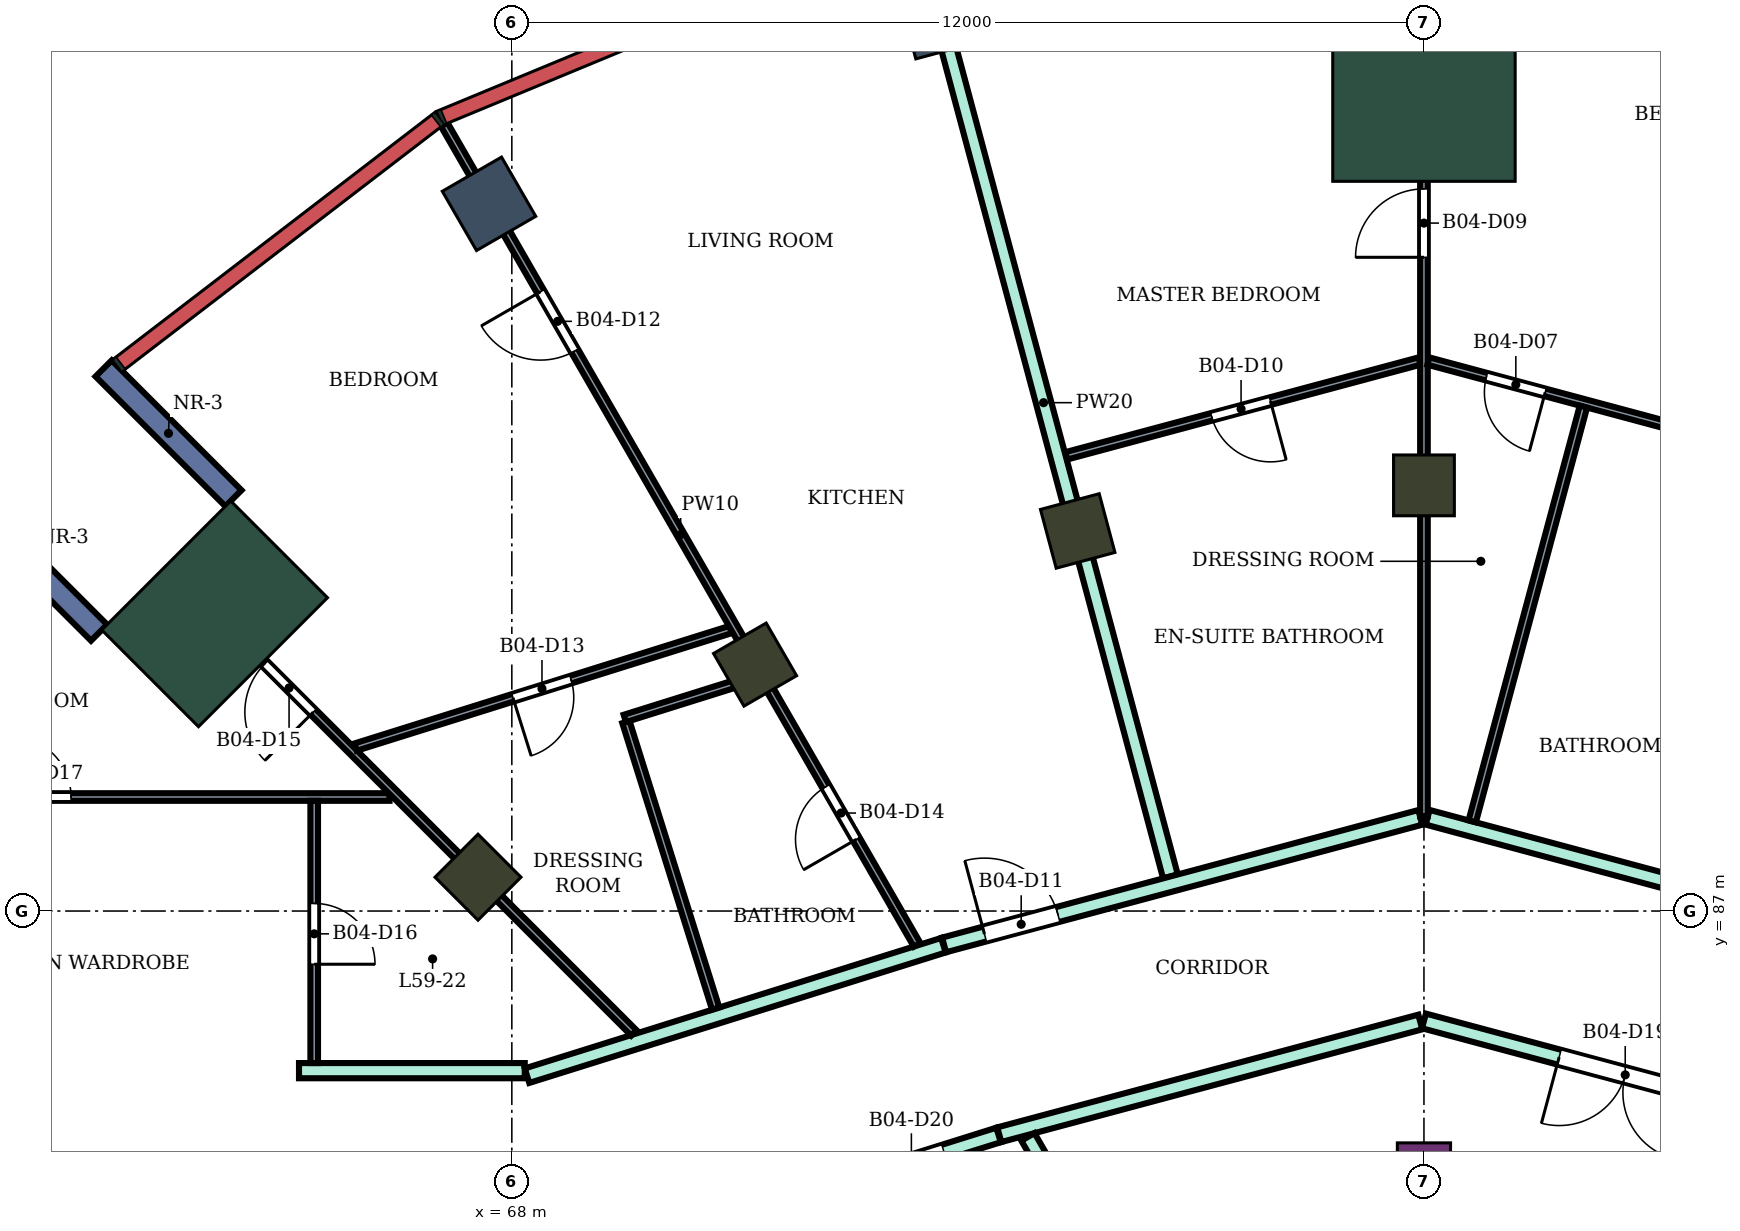
"""IFC4 building model, lengths in metres.
Left out: names, types, materials, properties, quantities, classifications, styles, units other than length and angle.
Written with IfcOpenShell. Run it as: python <this file> out.ifc"""

import sys

from ifc_helpers import new_model, si_unit, direction, frame, frame_2d, origin, origin_2d, place, context, subcontext, project, spatial, rectangle, extrude, element, fill, save


model = new_model("IFC4")
c1 = context("Model", 3, precision=1e-05, world=origin(), true_north=direction((0.0, 1.0)))
c2 = subcontext(c1, "Body", "Model", "MODEL_VIEW")
j1 = project(units=[si_unit("LENGTHUNIT", "METRE"), si_unit("PLANEANGLEUNIT", "RADIAN")], contexts=[c1])
p1 = place(None, origin())
s1 = spatial("IfcSite", under=j1, at=p1, CompositionType="ELEMENT")
p2 = place(p1, origin())
s2 = spatial("IfcBuilding", under=s1, at=p2, CompositionType="ELEMENT")
p3 = place(p2, frame((0.0, 0.0, 258.3)))
s3 = spatial("IfcBuildingStorey", under=s2, at=p3, CompositionType="ELEMENT", Elevation=258.3)
for number, where, z_axis, x_axis in (
    (1, (73.633, 98.762, 0.0), (0.0, 0.0, 1.0), (-0.259, 0.966, 0.0)),
    (2, (67.7, 96.304, 0.0), (0.0, 0.0, 1.0), (-0.5, 0.866, 0.0)),
):
    element("IfcColumn", number, at=place(p3, frame(where, z_axis=z_axis, x_axis=x_axis)), inside=s3, PredefinedType="COLUMN", context=c2, shape_type="SweptSolid", body=[
        extrude(rectangle(XDim=0.9, YDim=0.9, at=origin_2d()), origin(), (0.0, 0.0, 1.0), 4.2),
    ])
for number, where, z_axis, x_axis in (
    (3, (80.0, 92.6, 0.0), (0.0, 0.0, 1.0), (0.0, 1.0, 0.0)),
    (4, (75.445, 92.0, 0.0), (0.0, 0.0, 1.0), (-0.259, 0.966, 0.0)),
    (5, (71.2, 90.242, 0.0), (0.0, 0.0, 1.0), (-0.5, 0.866, 0.0)),
    (6, (67.555, 87.445, 0.0), (0.0, 0.0, 1.0), (-0.707, 0.707, 0.0)),
):
    element("IfcColumn", number, at=place(p3, frame(where, z_axis=z_axis, x_axis=x_axis)), inside=s3, PredefinedType="COLUMN", context=c2, shape_type="SweptSolid", body=[
        extrude(rectangle(XDim=0.8, YDim=0.8, at=origin_2d()), origin(), (0.0, 0.0, 1.0), 4.2),
    ])
p4 = place(p3, frame((80.0, 83.6, 0.0), z_axis=(0.0, 0.0, 1.0), x_axis=(0.0, 1.0, 0.0)))
e7 = element("IfcColumn", 7, at=p4, inside=s3, PredefinedType="COLUMN", context=c2, shape_type="SweptSolid", body=[
    extrude(rectangle(XDim=0.7, YDim=0.7, at=origin_2d()), origin(), (0.0, 0.0, 1.0), 4.2),
])
for number, where, z_axis, x_axis in (
    (8, (80.0, 97.5, 0.0), (0.0, 0.0, 1.0), (0.0, 1.0, 0.0)),
    (9, (64.09, 90.91, 0.0), (0.0, 0.0, 1.0), (-0.707, 0.707, 0.0)),
):
    element("IfcColumn", number, at=place(p3, frame(where, z_axis=z_axis, x_axis=x_axis)), inside=s3, PredefinedType="COLUMN", context=c2, shape_type="SweptSolid", body=[
        extrude(rectangle(XDim=1.8, YDim=2.4, at=origin_2d()), origin(), (0.0, 0.0, 1.0), 4.2),
    ])
for number, where, z_axis, x_axis in (
    (10, (64.338, 92.43, 0.0), (0.0, 0.0, 1.0), (-0.707, 0.707, 0.0)),
    (11, (62.57, 90.662, 0.0), (0.0, 0.0, 1.0), (-0.707, 0.707, 0.0)),
):
    element("IfcWall", number, at=place(p3, frame(where, z_axis=z_axis, x_axis=x_axis)), inside=s3, PredefinedType="NOTDEFINED", context=c2, shape_type="SweptSolid", body=[
        extrude(rectangle(XDim=2.416, YDim=0.3, at=frame_2d((1.208, 0.0))), origin(), (0.0, 0.0, 1.0), 4.2),
    ])
p5 = place(p3, frame((65.2, 84.9, 0.0), z_axis=(0.0, 0.0, 1.0), x_axis=(1.0, 0.0, 0.0)))
e12 = element("IfcWall", 12, at=p5, inside=s3, PredefinedType="PARTITIONING", context=c2, shape_type="SweptSolid", body=[
    extrude(rectangle(XDim=2.97, YDim=0.2, at=frame_2d((1.485, 0.0))), origin(), (0.0, 0.0, 1.0), 3.75),
])
p6 = place(p3, frame((68.2, 84.834, 0.0), z_axis=(0.0, 0.0, 1.0), x_axis=(0.954260265251, 0.298977166624, 0.0)))
e13 = element("IfcWall", 13, at=p6, inside=s3, PredefinedType="PARTITIONING", context=c2, shape_type="SweptSolid", body=[
    extrude(rectangle(XDim=5.741, YDim=0.2, at=frame_2d((2.87, 0.0))), origin(), (0.0, 0.0, 1.0), 3.75),
])
p7 = place(p3, frame((72.1, 83.332, 0.0), z_axis=(0.0, 0.0, 1.0), x_axis=(0.954233106619, 0.299063836383, 0.0)))
e14 = element("IfcWall", 14, at=p7, inside=s3, PredefinedType="PARTITIONING", context=c2, shape_type="SweptSolid", body=[
    extrude(rectangle(XDim=2.414, YDim=0.2, at=frame_2d((1.207, 0.0))), origin(), (0.0, 0.0, 1.0), 3.75),
])
p8 = place(p7, frame((0.762, 0.0, 0.0)))
e15 = element("IfcOpeningElement", 15, at=p8, cuts=e14, PredefinedType="OPENING", context=c2, shape_type="SweptSolid", body=[
    extrude(rectangle(XDim=0.9, YDim=2.1, at=frame_2d((0.45, 1.05))), frame((0.0, 0.11, 0.0), z_axis=(0.0, -1.0, 0.0), x_axis=(1.0, 0.0, 0.0)), (0.0, 0.0, 1.0), 0.22),
])
p9 = place(p3, frame((73.327, 99.92, 0.0), z_axis=(0.0, 0.0, 1.0), x_axis=(0.258652861824, -0.965970339643, 0.0)))
e16 = element("IfcWall", 16, at=p9, inside=s3, PredefinedType="PARTITIONING", context=c2, shape_type="SweptSolid", body=[
    extrude(rectangle(XDim=12.904, YDim=0.2, at=frame_2d((6.452, 0.0))), origin(), (0.0, 0.0, 1.0), 3.75),
])
p10 = place(p3, frame((73.687, 86.554, 0.0), z_axis=(0.0, 0.0, 1.0), x_axis=(0.965961994098, 0.258684027257, 0.0)))
e17 = element("IfcWall", 17, at=p10, inside=s3, PredefinedType="PARTITIONING", context=c2, shape_type="SweptSolid", body=[
    extrude(rectangle(XDim=6.486, YDim=0.2, at=frame_2d((3.243, 0.0))), origin(), (0.0, 0.0, 1.0), 3.75),
])
p11 = place(p10, frame((0.55, 0.0, 0.0)))
e18 = element("IfcOpeningElement", 18, at=p11, cuts=e17, PredefinedType="OPENING", context=c2, shape_type="SweptSolid", body=[
    extrude(rectangle(XDim=1.0, YDim=2.1, at=frame_2d((0.5, 1.05))), frame((0.0, 0.11, 0.0), z_axis=(0.0, -1.0, 0.0), x_axis=(1.0, 0.0, 0.0)), (0.0, 0.0, 1.0), 0.22),
])
p12 = place(p3, frame((74.413, 84.057, 0.0), z_axis=(0.0, 0.0, 1.0), x_axis=(0.965970849692, 0.258650956976, 0.0)))
e19 = element("IfcWall", 19, at=p12, inside=s3, PredefinedType="PARTITIONING", context=c2, shape_type="SweptSolid", body=[
    extrude(rectangle(XDim=5.734, YDim=0.2, at=frame_2d((2.867, 0.0))), origin(), (0.0, 0.0, 1.0), 3.75),
])
p13 = place(p3, frame((74.79, 84.028, 0.0), z_axis=(0.0, 0.0, 1.0), x_axis=(0.499859501914, -0.866106505198, 0.0)))
e20 = element("IfcWall", 20, at=p13, inside=s3, PredefinedType="PARTITIONING", context=c2, shape_type="SweptSolid", body=[
    extrude(rectangle(XDim=2.724, YDim=0.2, at=frame_2d((1.362, 0.0))), origin(), (0.0, 0.0, 1.0), 3.75),
])
p14 = place(p3, frame((80.0, 85.554, 0.0), z_axis=(0.0, 0.0, 1.0), x_axis=(0.965894438951, -0.258936155845, 0.0)))
e21 = element("IfcWall", 21, at=p14, inside=s3, PredefinedType="PARTITIONING", context=c2, shape_type="SweptSolid", body=[
    extrude(rectangle(XDim=5.774, YDim=0.2, at=frame_2d((2.887, 0.0))), origin(), (0.0, 0.0, 1.0), 3.75),
])
p15 = place(p14, frame((1.841, 0.0, 0.0)))
e22 = element("IfcOpeningElement", 22, at=p15, cuts=e21, PredefinedType="OPENING", context=c2, shape_type="SweptSolid", body=[
    extrude(rectangle(XDim=1.8, YDim=2.1, at=frame_2d((0.9, 1.05))), frame((0.0, 0.11, 0.0), z_axis=(0.0, -1.0, 0.0), x_axis=(1.0, 0.0, 0.0)), (0.0, 0.0, 1.0), 0.22),
])
p16 = place(p3, frame((80.048, 88.233, 0.0), z_axis=(0.0, 0.0, 1.0), x_axis=(0.965787353661, -0.259335280109, 0.0)))
e23 = element("IfcWall", 23, at=p16, inside=s3, PredefinedType="PARTITIONING", context=c2, shape_type="SweptSolid", body=[
    extrude(rectangle(XDim=6.476, YDim=0.2, at=frame_2d((3.238, 0.0))), origin(), (0.0, 0.0, 1.0), 3.75),
])
p17 = place(p16, frame((4.936, 0.0, 0.0)))
e24 = element("IfcOpeningElement", 24, at=p17, cuts=e23, PredefinedType="OPENING", context=c2, shape_type="SweptSolid", body=[
    extrude(rectangle(XDim=1.0, YDim=2.1, at=frame_2d((0.5, 1.05))), frame((0.0, 0.11, 0.0), z_axis=(0.0, -1.0, 0.0), x_axis=(1.0, 0.0, 0.0)), (0.0, 0.0, 1.0), 0.22),
])
p18 = place(p3, frame((58.072, 88.5, 0.0), z_axis=(0.0, 0.0, 1.0), x_axis=(1.0, 0.0, 0.0)))
e25 = element("IfcWall", 25, at=p18, inside=s3, PredefinedType="PARTITIONING", context=c2, shape_type="SweptSolid", body=[
    extrude(rectangle(XDim=8.319, YDim=0.1, at=frame_2d((4.159, 0.0))), origin(), (0.0, 0.0, 1.0), 3.75),
])
p19 = place(p18, frame((3.329, 0.0, 0.0)))
e26 = element("IfcOpeningElement", 26, at=p19, cuts=e25, PredefinedType="OPENING", context=c2, shape_type="SweptSolid", body=[
    extrude(rectangle(XDim=0.8, YDim=2.1, at=frame_2d((0.4, 1.05))), frame((0.0, 0.06, 0.0), z_axis=(0.0, -1.0, 0.0), x_axis=(1.0, 0.0, 0.0)), (0.0, 0.0, 1.0), 0.12),
])
p20 = place(p3, frame((63.597, 91.407, 0.0), z_axis=(0.0, 0.0, 1.0), x_axis=(0.70700623685, -0.707207311228, 0.0)))
e27 = element("IfcWall", 27, at=p20, inside=s3, PredefinedType="PARTITIONING", context=c2, shape_type="SweptSolid", body=[
    extrude(rectangle(XDim=8.499, YDim=0.1, at=frame_2d((4.25, 0.0))), origin(), (0.0, 0.0, 1.0), 3.75),
])
p21 = place(p20, frame((1.632, 0.0, 0.0)))
e28 = element("IfcOpeningElement", 28, at=p21, cuts=e27, PredefinedType="OPENING", context=c2, shape_type="SweptSolid", body=[
    extrude(rectangle(XDim=0.9, YDim=2.1, at=frame_2d((0.45, 1.05))), frame((0.0, 0.06, 0.0), z_axis=(0.0, -1.0, 0.0), x_axis=(1.0, 0.0, 0.0)), (0.0, 0.0, 1.0), 0.12),
])
p22 = place(p3, frame((65.4, 85.0, 0.0), z_axis=(0.0, 0.0, 1.0), x_axis=(0.0, 1.0, 0.0)))
e29 = element("IfcWall", 29, at=p22, inside=s3, PredefinedType="PARTITIONING", context=c2, shape_type="SweptSolid", body=[
    extrude(rectangle(XDim=3.45, YDim=0.1, at=frame_2d((1.725, 0.0))), origin(), (0.0, 0.0, 1.0), 3.75),
])
p23 = place(p22, frame((1.3, 0.0, 0.0)))
e30 = element("IfcOpeningElement", 30, at=p23, cuts=e29, PredefinedType="OPENING", context=c2, shape_type="SweptSolid", body=[
    extrude(rectangle(XDim=0.8, YDim=2.1, at=frame_2d((0.4, 1.05))), frame((0.0, 0.06, 0.0), z_axis=(0.0, -1.0, 0.0), x_axis=(1.0, 0.0, 0.0)), (0.0, 0.0, 1.0), 0.12),
])
p24 = place(p3, frame((65.944, 89.157, 0.0), z_axis=(0.0, 0.0, 1.0), x_axis=(0.954238484697, 0.299046675828, 0.0)))
e31 = element("IfcWall", 31, at=p24, inside=s3, PredefinedType="PARTITIONING", context=c2, shape_type="SweptSolid", body=[
    extrude(rectangle(XDim=5.169, YDim=0.1, at=frame_2d((2.585, 0.0))), origin(), (0.0, 0.0, 1.0), 3.75),
])
p25 = place(p24, frame((2.17, 0.0, 0.0)))
e32 = element("IfcOpeningElement", 32, at=p25, cuts=e31, PredefinedType="OPENING", context=c2, shape_type="SweptSolid", body=[
    extrude(rectangle(XDim=0.8, YDim=2.1, at=frame_2d((0.4, 1.05))), frame((0.0, 0.06, 0.0), z_axis=(0.0, -1.0, 0.0), x_axis=(1.0, 0.0, 0.0)), (0.0, 0.0, 1.0), 0.12),
])
p26 = place(p3, frame((67.111, 97.347, 0.0), z_axis=(0.0, 0.0, 1.0), x_axis=(0.499428303955, -0.866355221147, 0.0)))
e33 = element("IfcWall", 33, at=p26, inside=s3, PredefinedType="PARTITIONING", context=c2, shape_type="SweptSolid", body=[
    extrude(rectangle(XDim=12.456, YDim=0.1, at=frame_2d((6.228, 0.0))), origin(), (0.0, 0.0, 1.0), 3.75),
])
p27 = place(p26, frame((2.538, 0.0, 0.0)))
e34 = element("IfcOpeningElement", 34, at=p27, cuts=e33, PredefinedType="OPENING", context=c2, shape_type="SweptSolid", body=[
    extrude(rectangle(XDim=0.9, YDim=2.1, at=frame_2d((0.45, 1.05))), frame((0.0, 0.06, 0.0), z_axis=(0.0, -1.0, 0.0), x_axis=(1.0, 0.0, 0.0)), (0.0, 0.0, 1.0), 0.12),
])
p28 = place(p26, frame((10.055, 0.0, 0.0)))
e35 = element("IfcOpeningElement", 35, at=p28, cuts=e33, PredefinedType="OPENING", context=c2, shape_type="SweptSolid", body=[
    extrude(rectangle(XDim=0.8, YDim=2.1, at=frame_2d((0.4, 1.05))), frame((0.0, 0.06, 0.0), z_axis=(0.0, -1.0, 0.0), x_axis=(1.0, 0.0, 0.0)), (0.0, 0.0, 1.0), 0.12),
])
p29 = place(p3, frame((69.501, 89.486, 0.0), z_axis=(0.0, 0.0, 1.0), x_axis=(0.298971609069, -0.954262006459, 0.0)))
e36 = element("IfcWall", 36, at=p29, inside=s3, PredefinedType="PARTITIONING", context=c2, shape_type="SweptSolid", body=[
    extrude(rectangle(XDim=3.951, YDim=0.1, at=frame_2d((1.975, 0.0))), origin(), (0.0, 0.0, 1.0), 3.75),
])
p30 = place(p3, frame((69.486, 89.534, 0.0), z_axis=(0.0, 0.0, 1.0), x_axis=(0.954254575134, 0.298995327449, 0.0)))
e37 = element("IfcWall", 37, at=p30, inside=s3, PredefinedType="PARTITIONING", context=c2, shape_type="SweptSolid", body=[
    extrude(rectangle(XDim=1.833, YDim=0.1, at=frame_2d((0.917, 0.0))), origin(), (0.0, 0.0, 1.0), 3.75),
])
p31 = place(p3, frame((75.294, 92.989, 0.0), z_axis=(0.0, 0.0, 1.0), x_axis=(0.965836333205, 0.259152807165, 0.0)))
e38 = element("IfcWall", 38, at=p31, inside=s3, PredefinedType="PARTITIONING", context=c2, shape_type="SweptSolid", body=[
    extrude(rectangle(XDim=4.812, YDim=0.1, at=frame_2d((2.406, 0.0))), origin(), (0.0, 0.0, 1.0), 3.75),
])
p32 = place(p31, frame((1.981, 0.0, 0.0)))
e39 = element("IfcOpeningElement", 39, at=p32, cuts=e38, PredefinedType="OPENING", context=c2, shape_type="SweptSolid", body=[
    extrude(rectangle(XDim=0.8, YDim=2.1, at=frame_2d((0.4, 1.05))), frame((0.0, 0.06, 0.0), z_axis=(0.0, -1.0, 0.0), x_axis=(1.0, 0.0, 0.0)), (0.0, 0.0, 1.0), 0.12),
])
p33 = place(p3, frame((80.0, 88.246, 0.0), z_axis=(0.0, 0.0, 1.0), x_axis=(0.0, 1.0, 0.0)))
e40 = element("IfcWall", 40, at=p33, inside=s3, PredefinedType="PARTITIONING", context=c2, shape_type="SweptSolid", body=[
    extrude(rectangle(XDim=9.954, YDim=0.1, at=frame_2d((4.977, 0.0))), origin(), (0.0, 0.0, 1.0), 3.75),
])
p34 = place(p33, frame((7.354, 0.0, 0.0)))
e41 = element("IfcOpeningElement", 41, at=p34, cuts=e40, PredefinedType="OPENING", context=c2, shape_type="SweptSolid", body=[
    extrude(rectangle(XDim=0.9, YDim=2.1, at=frame_2d((0.45, 1.05))), frame((0.0, 0.06, 0.0), z_axis=(0.0, -1.0, 0.0), x_axis=(1.0, 0.0, 0.0)), (0.0, 0.0, 1.0), 0.12),
])
p35 = place(p3, frame((80.058, 94.235, 0.0), z_axis=(0.0, 0.0, 1.0), x_axis=(0.965831212389, -0.259171891173, 0.0)))
e42 = element("IfcWall", 42, at=p35, inside=s3, PredefinedType="PARTITIONING", context=c2, shape_type="SweptSolid", body=[
    extrude(rectangle(XDim=4.872, YDim=0.1, at=frame_2d((2.436, 0.0))), origin(), (0.0, 0.0, 1.0), 3.75),
])
p36 = place(p35, frame((0.792, 0.0, 0.0)))
e43 = element("IfcOpeningElement", 43, at=p36, cuts=e42, PredefinedType="OPENING", context=c2, shape_type="SweptSolid", body=[
    extrude(rectangle(XDim=0.8, YDim=2.1, at=frame_2d((0.4, 1.05))), frame((0.0, 0.06, 0.0), z_axis=(0.0, -1.0, 0.0), x_axis=(1.0, 0.0, 0.0)), (0.0, 0.0, 1.0), 0.12),
])
p37 = place(p3, frame((80.635, 88.179, 0.0), z_axis=(0.0, 0.0, 1.0), x_axis=(0.258942728312, 0.965892676986, 0.0)))
e44 = element("IfcWall", 44, at=p37, inside=s3, PredefinedType="PARTITIONING", context=c2, shape_type="SweptSolid", body=[
    extrude(rectangle(XDim=5.649, YDim=0.1, at=frame_2d((2.825, 0.0))), origin(), (0.0, 0.0, 1.0), 3.75),
])
p38 = place(p36, frame((0.8, 0.0, 0.0), z_axis=(0.0, 0.0, 1.0), x_axis=(-1.0, 0.0, 0.0)))
e45 = element("IfcDoor", 45, at=p38, inside=s3, OperationType="SINGLE_SWING_LEFT", PredefinedType="DOOR", context=c2, shape_type="SweptSolid", body=[
    extrude(rectangle(XDim=0.8, YDim=2.1, at=frame_2d((0.4, 1.05))), frame((0.0, 0.025, 0.0), z_axis=(0.0, -1.0, 0.0), x_axis=(1.0, 0.0, 0.0)), (0.0, 0.0, 1.0), 0.05),
])
fill(e43, e45)
p39 = place(p34, origin())
e46 = element("IfcDoor", 46, at=p39, inside=s3, OperationType="SINGLE_SWING_LEFT", PredefinedType="DOOR", context=c2, shape_type="SweptSolid", body=[
    extrude(rectangle(XDim=0.9, YDim=2.1, at=frame_2d((0.45, 1.05))), frame((0.0, 0.025, 0.0), z_axis=(0.0, -1.0, 0.0), x_axis=(1.0, 0.0, 0.0)), (0.0, 0.0, 1.0), 0.05),
])
fill(e41, e46)
p40 = place(p32, frame((0.8, 0.0, 0.0), z_axis=(0.0, 0.0, 1.0), x_axis=(-1.0, 0.0, 0.0)))
e47 = element("IfcDoor", 47, at=p40, inside=s3, OperationType="SINGLE_SWING_LEFT", PredefinedType="DOOR", context=c2, shape_type="SweptSolid", body=[
    extrude(rectangle(XDim=0.8, YDim=2.1, at=frame_2d((0.4, 1.05))), frame((0.0, 0.025, 0.0), z_axis=(0.0, -1.0, 0.0), x_axis=(1.0, 0.0, 0.0)), (0.0, 0.0, 1.0), 0.05),
])
fill(e39, e47)
p41 = place(p11, origin())
e48 = element("IfcDoor", 48, at=p41, inside=s3, OperationType="SINGLE_SWING_LEFT", PredefinedType="DOOR", context=c2, shape_type="SweptSolid", body=[
    extrude(rectangle(XDim=1.0, YDim=2.1, at=frame_2d((0.5, 1.05))), frame((0.0, 0.025, 0.0), z_axis=(0.0, -1.0, 0.0), x_axis=(1.0, 0.0, 0.0)), (0.0, 0.0, 1.0), 0.05),
])
fill(e18, e48)
p42 = place(p27, frame((0.9, 0.0, 0.0), z_axis=(0.0, 0.0, 1.0), x_axis=(-1.0, 0.0, 0.0)))
e49 = element("IfcDoor", 49, at=p42, inside=s3, OperationType="SINGLE_SWING_RIGHT", PredefinedType="DOOR", context=c2, shape_type="SweptSolid", body=[
    extrude(rectangle(XDim=0.9, YDim=2.1, at=frame_2d((0.45, 1.05))), frame((0.0, 0.025, 0.0), z_axis=(0.0, -1.0, 0.0), x_axis=(1.0, 0.0, 0.0)), (0.0, 0.0, 1.0), 0.05),
])
fill(e34, e49)
p43 = place(p25, frame((0.8, 0.0, 0.0), z_axis=(0.0, 0.0, 1.0), x_axis=(-1.0, 0.0, 0.0)))
e50 = element("IfcDoor", 50, at=p43, inside=s3, OperationType="SINGLE_SWING_RIGHT", PredefinedType="DOOR", context=c2, shape_type="SweptSolid", body=[
    extrude(rectangle(XDim=0.8, YDim=2.1, at=frame_2d((0.4, 1.05))), frame((0.0, 0.025, 0.0), z_axis=(0.0, -1.0, 0.0), x_axis=(1.0, 0.0, 0.0)), (0.0, 0.0, 1.0), 0.05),
])
fill(e32, e50)
p44 = place(p28, frame((0.8, 0.0, 0.0), z_axis=(0.0, 0.0, 1.0), x_axis=(-1.0, 0.0, 0.0)))
e51 = element("IfcDoor", 51, at=p44, inside=s3, OperationType="SINGLE_SWING_LEFT", PredefinedType="DOOR", context=c2, shape_type="SweptSolid", body=[
    extrude(rectangle(XDim=0.8, YDim=2.1, at=frame_2d((0.4, 1.05))), frame((0.0, 0.025, 0.0), z_axis=(0.0, -1.0, 0.0), x_axis=(1.0, 0.0, 0.0)), (0.0, 0.0, 1.0), 0.05),
])
fill(e35, e51)
p45 = place(p21, frame((0.9, 0.0, 0.0), z_axis=(0.0, 0.0, 1.0), x_axis=(-1.0, 0.0, 0.0)))
e52 = element("IfcDoor", 52, at=p45, inside=s3, OperationType="SINGLE_SWING_LEFT", PredefinedType="DOOR", context=c2, shape_type="SweptSolid", body=[
    extrude(rectangle(XDim=0.9, YDim=2.1, at=frame_2d((0.45, 1.05))), frame((0.0, 0.025, 0.0), z_axis=(0.0, -1.0, 0.0), x_axis=(1.0, 0.0, 0.0)), (0.0, 0.0, 1.0), 0.05),
])
fill(e28, e52)
p46 = place(p23, frame((0.8, 0.0, 0.0), z_axis=(0.0, 0.0, 1.0), x_axis=(-1.0, 0.0, 0.0)))
e53 = element("IfcDoor", 53, at=p46, inside=s3, OperationType="SINGLE_SWING_RIGHT", PredefinedType="DOOR", context=c2, shape_type="SweptSolid", body=[
    extrude(rectangle(XDim=0.8, YDim=2.1, at=frame_2d((0.4, 1.05))), frame((0.0, 0.025, 0.0), z_axis=(0.0, -1.0, 0.0), x_axis=(1.0, 0.0, 0.0)), (0.0, 0.0, 1.0), 0.05),
])
fill(e30, e53)
p47 = place(p19, origin())
e54 = element("IfcDoor", 54, at=p47, inside=s3, OperationType="SINGLE_SWING_LEFT", PredefinedType="DOOR", context=c2, shape_type="SweptSolid", body=[
    extrude(rectangle(XDim=0.8, YDim=2.1, at=frame_2d((0.4, 1.05))), frame((0.0, 0.025, 0.0), z_axis=(0.0, -1.0, 0.0), x_axis=(1.0, 0.0, 0.0)), (0.0, 0.0, 1.0), 0.05),
])
fill(e26, e54)
p48 = place(p15, frame((1.8, 0.0, 0.0), z_axis=(0.0, 0.0, 1.0), x_axis=(-1.0, 0.0, 0.0)))
e55 = element("IfcDoor", 55, at=p48, inside=s3, OperationType="DOUBLE_DOOR_SINGLE_SWING", PredefinedType="DOOR", context=c2, shape_type="SweptSolid", body=[
    extrude(rectangle(XDim=1.8, YDim=2.1, at=frame_2d((0.9, 1.05))), frame((0.0, 0.025, 0.0), z_axis=(0.0, -1.0, 0.0), x_axis=(1.0, 0.0, 0.0)), (0.0, 0.0, 1.0), 0.05),
])
fill(e22, e55)
p49 = place(p8, frame((0.9, 0.0, 0.0), z_axis=(0.0, 0.0, 1.0), x_axis=(-1.0, 0.0, 0.0)))
e56 = element("IfcDoor", 56, at=p49, inside=s3, OperationType="SINGLE_SWING_RIGHT", PredefinedType="DOOR", context=c2, shape_type="SweptSolid", body=[
    extrude(rectangle(XDim=0.9, YDim=2.1, at=frame_2d((0.45, 1.05))), frame((0.0, 0.025, 0.0), z_axis=(0.0, -1.0, 0.0), x_axis=(1.0, 0.0, 0.0)), (0.0, 0.0, 1.0), 0.05),
])
fill(e15, e56)
save(model, sys.argv[1])
